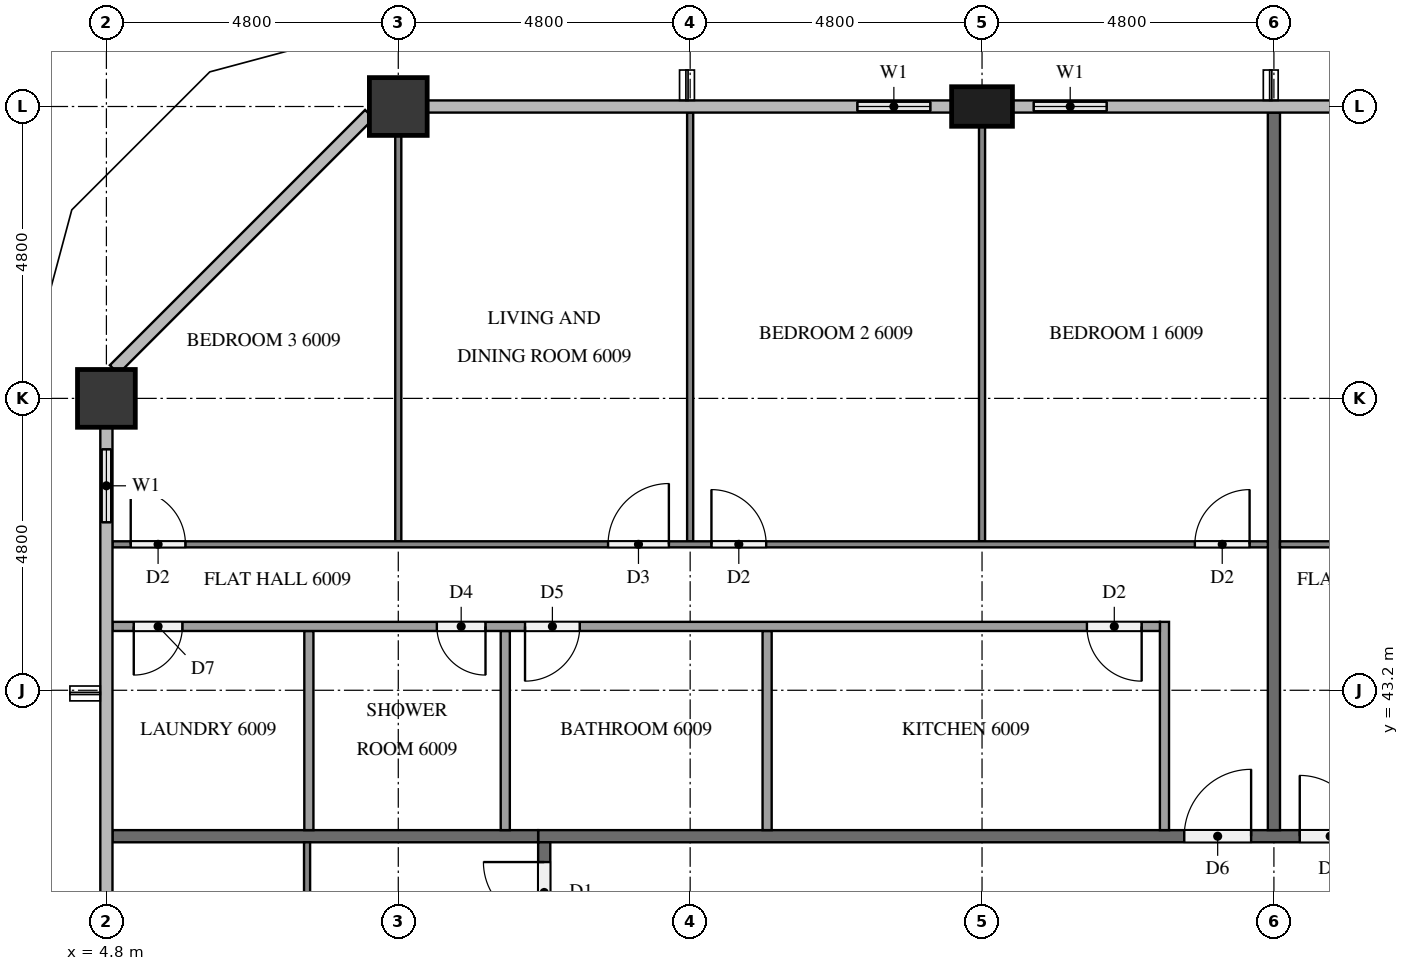
"""IFC4 building model, lengths in metres.
Left out: names, types, materials, properties, quantities, classifications, styles, units other than length and angle.
Written with IfcOpenShell. Run it as: python <this file> out.ifc"""

import sys

from ifc_helpers import new_model, si_unit, direction, frame, frame_2d, origin, origin_2d, place, context, subcontext, project, spatial, rectangle, extrude, element, fill, save


model = new_model("IFC4")
c1 = context("Model", 3, precision=1e-05, world=origin(), true_north=direction((0.0, 1.0)))
c2 = subcontext(c1, "Body", "Model", "MODEL_VIEW")
j1 = project(units=[si_unit("LENGTHUNIT", "METRE"), si_unit("PLANEANGLEUNIT", "RADIAN")], contexts=[c1])
p1 = place(None, origin())
s1 = spatial("IfcSite", under=j1, at=p1, CompositionType="ELEMENT")
p2 = place(p1, origin())
s2 = spatial("IfcBuilding", under=s1, at=p2, CompositionType="ELEMENT")
p3 = place(p2, frame((0.0, 0.0, 229.8)))
s3 = spatial("IfcBuildingStorey", under=s2, at=p3, CompositionType="ELEMENT", Elevation=229.8)
p4 = place(p3, frame((19.2, 52.8, 0.0), z_axis=(0.0, 0.0, 1.0), x_axis=(1.0, 0.0, 0.0)))
e1 = element("IfcColumn", 1, at=p4, inside=s3, PredefinedType="COLUMN", context=c2, shape_type="SweptSolid", body=[
    extrude(rectangle(XDim=1.0, YDim=0.65, at=origin_2d()), origin(), (0.0, 0.0, 1.0), 3.1),
])
for number, where, z_axis, x_axis in (
    (2, (9.6, 52.8, 0.0), (0.0, 0.0, 1.0), (1.0, 0.0, 0.0)),
    (3, (4.8, 48.0, 0.0), (0.0, 0.0, 1.0), (1.0, 0.0, 0.0)),
):
    element("IfcColumn", number, at=place(p3, frame(where, z_axis=z_axis, x_axis=x_axis)), inside=s3, PredefinedType="COLUMN", context=c2, shape_type="SweptSolid", body=[
        extrude(rectangle(XDim=0.95, YDim=0.95, at=origin_2d()), origin(), (0.0, 0.0, 1.0), 3.1),
    ])
p5 = place(p3, frame((21.6, 52.8, 0.0), z_axis=(0.0, 0.0, 1.0), x_axis=(-1.0, 0.0, 0.0)))
e4 = element("IfcWall", 4, at=p5, inside=s3, PredefinedType="SOLIDWALL", context=c2, shape_type="SweptSolid", body=[
    extrude(rectangle(XDim=1.9, YDim=0.15, at=frame_2d((0.95, 0.0))), origin(), (0.0, 0.0, 1.0), 3.1),
])
p6 = place(p5, frame((0.35, 0.0, 0.9)))
e5 = element("IfcOpeningElement", 5, at=p6, cuts=e4, PredefinedType="OPENING", context=c2, shape_type="SweptSolid", body=[
    extrude(rectangle(XDim=1.2, YDim=1.4, at=frame_2d((0.6, 0.7))), frame((0.0, 0.085, 0.0), z_axis=(0.0, -1.0, 0.0), x_axis=(1.0, 0.0, 0.0)), (0.0, 0.0, 1.0), 0.17),
])
p7 = place(p3, frame((18.7, 52.8, 0.0), z_axis=(0.0, 0.0, 1.0), x_axis=(-1.0, 0.0, 0.0)))
e6 = element("IfcWall", 6, at=p7, inside=s3, PredefinedType="SOLIDWALL", context=c2, shape_type="SweptSolid", body=[
    extrude(rectangle(XDim=1.9, YDim=0.15, at=frame_2d((0.95, 0.0))), origin(), (0.0, 0.0, 1.0), 3.1),
])
p8 = place(p7, frame((0.35, 0.0, 0.9)))
e7 = element("IfcOpeningElement", 7, at=p8, cuts=e6, PredefinedType="OPENING", context=c2, shape_type="SweptSolid", body=[
    extrude(rectangle(XDim=1.2, YDim=1.4, at=frame_2d((0.6, 0.7))), frame((0.0, 0.085, 0.0), z_axis=(0.0, -1.0, 0.0), x_axis=(1.0, 0.0, 0.0)), (0.0, 0.0, 1.0), 0.17),
])
p9 = place(p3, frame((4.8, 47.525, 0.0), z_axis=(0.0, 0.0, 1.0), x_axis=(0.0, -1.0, 0.0)))
e8 = element("IfcWall", 8, at=p9, inside=s3, PredefinedType="SOLIDWALL", context=c2, shape_type="SweptSolid", body=[
    extrude(rectangle(XDim=1.925, YDim=0.15, at=frame_2d((0.962, 0.0))), origin(), (0.0, 0.0, 1.0), 3.1),
])
p10 = place(p9, frame((0.363, 0.0, 0.9)))
e9 = element("IfcOpeningElement", 9, at=p10, cuts=e8, PredefinedType="OPENING", context=c2, shape_type="SweptSolid", body=[
    extrude(rectangle(XDim=1.2, YDim=1.4, at=frame_2d((0.6, 0.7))), frame((0.0, 0.085, 0.0), z_axis=(0.0, -1.0, 0.0), x_axis=(1.0, 0.0, 0.0)), (0.0, 0.0, 1.0), 0.17),
])
p11 = place(p3, frame((11.9, 40.8, 0.0), z_axis=(0.0, 0.0, 1.0), x_axis=(1.0, 0.0, 0.0)))
e10 = element("IfcWall", 10, at=p11, inside=s3, PredefinedType="PARTITIONING", context=c2, shape_type="SweptSolid", body=[
    extrude(rectangle(XDim=38.6, YDim=0.2, at=frame_2d((19.3, 0.0))), origin(), (0.0, 0.0, 1.0), 3.1),
])
p12 = place(p11, frame((37.075, 0.0, 0.0)))
e11 = element("IfcOpeningElement", 11, at=p12, cuts=e10, PredefinedType="OPENING", context=c2, shape_type="SweptSolid", body=[
    extrude(rectangle(XDim=1.0, YDim=2.1, at=frame_2d((0.5, 1.05))), frame((0.0, 0.11, 0.0), z_axis=(0.0, -1.0, 0.0), x_axis=(1.0, 0.0, 0.0)), (0.0, 0.0, 1.0), 0.22),
])
p13 = place(p11, frame((12.525, 0.0, 0.0)))
e12 = element("IfcOpeningElement", 12, at=p13, cuts=e10, PredefinedType="OPENING", context=c2, shape_type="SweptSolid", body=[
    extrude(rectangle(XDim=1.0, YDim=2.1, at=frame_2d((0.5, 1.05))), frame((0.0, 0.11, 0.0), z_axis=(0.0, -1.0, 0.0), x_axis=(1.0, 0.0, 0.0)), (0.0, 0.0, 1.0), 0.22),
])
p14 = place(p11, frame((10.625, 0.0, 0.0)))
e13 = element("IfcOpeningElement", 13, at=p14, cuts=e10, PredefinedType="OPENING", context=c2, shape_type="SweptSolid", body=[
    extrude(rectangle(XDim=1.1, YDim=2.1, at=frame_2d((0.55, 1.05))), frame((0.0, 0.11, 0.0), z_axis=(0.0, -1.0, 0.0), x_axis=(1.0, 0.0, 0.0)), (0.0, 0.0, 1.0), 0.22),
])
p15 = place(p3, frame((12.0, 12.1, 0.0), z_axis=(0.0, 0.0, 1.0), x_axis=(0.0, 1.0, 0.0)))
e14 = element("IfcWall", 14, at=p15, inside=s3, PredefinedType="PARTITIONING", context=c2, shape_type="SweptSolid", body=[
    extrude(rectangle(XDim=28.6, YDim=0.2, at=frame_2d((14.3, 0.0))), origin(), (0.0, 0.0, 1.0), 3.1),
])
p16 = place(p15, frame((27.275, 0.0, 0.0)))
e15 = element("IfcOpeningElement", 15, at=p16, cuts=e14, PredefinedType="OPENING", context=c2, shape_type="SweptSolid", body=[
    extrude(rectangle(XDim=1.0, YDim=2.1, at=frame_2d((0.5, 1.05))), frame((0.0, 0.11, 0.0), z_axis=(0.0, -1.0, 0.0), x_axis=(1.0, 0.0, 0.0)), (0.0, 0.0, 1.0), 0.22),
])
p17 = place(p15, frame((20.075, 0.0, 0.0)))
e16 = element("IfcOpeningElement", 16, at=p17, cuts=e14, PredefinedType="OPENING", context=c2, shape_type="SweptSolid", body=[
    extrude(rectangle(XDim=1.0, YDim=2.1, at=frame_2d((0.5, 1.05))), frame((0.0, 0.11, 0.0), z_axis=(0.0, -1.0, 0.0), x_axis=(1.0, 0.0, 0.0)), (0.0, 0.0, 1.0), 0.22),
])
p18 = place(p15, frame((10.425, 0.0, 0.0)))
e17 = element("IfcOpeningElement", 17, at=p18, cuts=e14, PredefinedType="OPENING", context=c2, shape_type="SweptSolid", body=[
    extrude(rectangle(XDim=1.1, YDim=2.1, at=frame_2d((0.55, 1.05))), frame((0.0, 0.11, 0.0), z_axis=(0.0, -1.0, 0.0), x_axis=(1.0, 0.0, 0.0)), (0.0, 0.0, 1.0), 0.22),
])
p19 = place(p3, frame((24.0, 52.7, 0.0), z_axis=(0.0, 0.0, 1.0), x_axis=(0.0, -1.0, 0.0)))
e18 = element("IfcWall", 18, at=p19, inside=s3, PredefinedType="PARTITIONING", context=c2, shape_type="SweptSolid", body=[
    extrude(rectangle(XDim=11.8, YDim=0.2, at=frame_2d((5.9, 0.0))), origin(), (0.0, 0.0, 1.0), 3.1),
])
p20 = place(p3, frame((4.9, 40.8, 0.0), z_axis=(0.0, 0.0, 1.0), x_axis=(1.0, 0.0, 0.0)))
e19 = element("IfcWall", 19, at=p20, inside=s3, PredefinedType="PARTITIONING", context=c2, shape_type="SweptSolid", body=[
    extrude(rectangle(XDim=7.0, YDim=0.2, at=frame_2d((3.5, 0.0))), origin(), (0.0, 0.0, 1.0), 3.1),
])
p21 = place(p3, frame((24.1, 45.6, 0.0), z_axis=(0.0, 0.0, 1.0), x_axis=(1.0, 0.0, 0.0)))
e20 = element("IfcWall", 20, at=p21, inside=s3, PredefinedType="PARTITIONING", context=c2, shape_type="SweptSolid", body=[
    extrude(rectangle(XDim=14.2, YDim=0.1, at=frame_2d((7.1, 0.0))), origin(), (0.0, 0.0, 1.0), 3.1),
])
p22 = place(p21, frame((3.45, 0.0, 0.0)))
e21 = element("IfcOpeningElement", 21, at=p22, cuts=e20, PredefinedType="OPENING", context=c2, shape_type="SweptSolid", body=[
    extrude(rectangle(XDim=0.9, YDim=2.1, at=frame_2d((0.45, 1.05))), frame((0.0, 0.06, 0.0), z_axis=(0.0, -1.0, 0.0), x_axis=(1.0, 0.0, 0.0)), (0.0, 0.0, 1.0), 0.12),
])
p23 = place(p21, frame((5.05, 0.0, 0.0)))
e22 = element("IfcOpeningElement", 22, at=p23, cuts=e20, PredefinedType="OPENING", context=c2, shape_type="SweptSolid", body=[
    extrude(rectangle(XDim=1.0, YDim=2.1, at=frame_2d((0.5, 1.05))), frame((0.0, 0.06, 0.0), z_axis=(0.0, -1.0, 0.0), x_axis=(1.0, 0.0, 0.0)), (0.0, 0.0, 1.0), 0.12),
])
p24 = place(p21, frame((13.0, 0.0, 0.0)))
e23 = element("IfcOpeningElement", 23, at=p24, cuts=e20, PredefinedType="OPENING", context=c2, shape_type="SweptSolid", body=[
    extrude(rectangle(XDim=0.9, YDim=2.1, at=frame_2d((0.45, 1.05))), frame((0.0, 0.06, 0.0), z_axis=(0.0, -1.0, 0.0), x_axis=(1.0, 0.0, 0.0)), (0.0, 0.0, 1.0), 0.12),
])
p25 = place(p3, frame((19.2, 45.65, 0.0), z_axis=(0.0, 0.0, 1.0), x_axis=(0.0, 1.0, 0.0)))
e24 = element("IfcWall", 24, at=p25, inside=s3, PredefinedType="PARTITIONING", context=c2, shape_type="SweptSolid", body=[
    extrude(rectangle(XDim=6.825, YDim=0.1, at=frame_2d((3.413, 0.0))), origin(), (0.0, 0.0, 1.0), 3.1),
])
p26 = place(p3, frame((14.4, 45.65, 0.0), z_axis=(0.0, 0.0, 1.0), x_axis=(0.0, 1.0, 0.0)))
e25 = element("IfcWall", 25, at=p26, inside=s3, PredefinedType="PARTITIONING", context=c2, shape_type="SweptSolid", body=[
    extrude(rectangle(XDim=7.05, YDim=0.1, at=frame_2d((3.525, 0.0))), origin(), (0.0, 0.0, 1.0), 3.1),
])
p27 = place(p3, frame((9.6, 45.65, 0.0), z_axis=(0.0, 0.0, 1.0), x_axis=(0.0, 1.0, 0.0)))
e26 = element("IfcWall", 26, at=p27, inside=s3, PredefinedType="PARTITIONING", context=c2, shape_type="SweptSolid", body=[
    extrude(rectangle(XDim=6.675, YDim=0.1, at=frame_2d((3.337, 0.0))), origin(), (0.0, 0.0, 1.0), 3.1),
])
p28 = place(p3, frame((4.9, 45.6, 0.0), z_axis=(0.0, 0.0, 1.0), x_axis=(1.0, 0.0, 0.0)))
e27 = element("IfcWall", 27, at=p28, inside=s3, PredefinedType="PARTITIONING", context=c2, shape_type="SweptSolid", body=[
    extrude(rectangle(XDim=19.0, YDim=0.1, at=frame_2d((9.5, 0.0))), origin(), (0.0, 0.0, 1.0), 3.1),
])
p29 = place(p28, frame((17.8, 0.0, 0.0)))
e28 = element("IfcOpeningElement", 28, at=p29, cuts=e27, PredefinedType="OPENING", context=c2, shape_type="SweptSolid", body=[
    extrude(rectangle(XDim=0.9, YDim=2.1, at=frame_2d((0.45, 1.05))), frame((0.0, 0.06, 0.0), z_axis=(0.0, -1.0, 0.0), x_axis=(1.0, 0.0, 0.0)), (0.0, 0.0, 1.0), 0.12),
])
p30 = place(p28, frame((9.85, 0.0, 0.0)))
e29 = element("IfcOpeningElement", 29, at=p30, cuts=e27, PredefinedType="OPENING", context=c2, shape_type="SweptSolid", body=[
    extrude(rectangle(XDim=0.9, YDim=2.1, at=frame_2d((0.45, 1.05))), frame((0.0, 0.06, 0.0), z_axis=(0.0, -1.0, 0.0), x_axis=(1.0, 0.0, 0.0)), (0.0, 0.0, 1.0), 0.12),
])
p31 = place(p28, frame((8.15, 0.0, 0.0)))
e30 = element("IfcOpeningElement", 30, at=p31, cuts=e27, PredefinedType="OPENING", context=c2, shape_type="SweptSolid", body=[
    extrude(rectangle(XDim=1.0, YDim=2.1, at=frame_2d((0.5, 1.05))), frame((0.0, 0.06, 0.0), z_axis=(0.0, -1.0, 0.0), x_axis=(1.0, 0.0, 0.0)), (0.0, 0.0, 1.0), 0.12),
])
p32 = place(p28, frame((0.3, 0.0, 0.0)))
e31 = element("IfcOpeningElement", 31, at=p32, cuts=e27, PredefinedType="OPENING", context=c2, shape_type="SweptSolid", body=[
    extrude(rectangle(XDim=0.9, YDim=2.1, at=frame_2d((0.45, 1.05))), frame((0.0, 0.06, 0.0), z_axis=(0.0, -1.0, 0.0), x_axis=(1.0, 0.0, 0.0)), (0.0, 0.0, 1.0), 0.12),
])
for number, where, z_axis, x_axis in (
    (32, (15.666, 40.9, 0.0), (0.0, 0.0, 1.0), (0.0, 1.0, 0.0)),
    (33, (11.359, 40.9, 0.0), (0.0, 0.0, 1.0), (0.0, 1.0, 0.0)),
    (34, (8.13, 40.9, 0.0), (0.0, 0.0, 1.0), (0.0, 1.0, 0.0)),
):
    element("IfcWall", number, at=place(p3, frame(where, z_axis=z_axis, x_axis=x_axis)), inside=s3, PredefinedType="PARTITIONING", context=c2, shape_type="SweptSolid", body=[
        extrude(rectangle(XDim=3.275, YDim=0.15, at=frame_2d((1.638, 0.0))), origin(), (0.0, 0.0, 1.0), 3.1),
    ])
p33 = place(p3, frame((22.2, 40.9, 0.0), z_axis=(0.0, 0.0, 1.0), x_axis=(0.0, 1.0, 0.0)))
e35 = element("IfcWall", 35, at=p33, inside=s3, PredefinedType="PARTITIONING", context=c2, shape_type="SweptSolid", body=[
    extrude(rectangle(XDim=3.425, YDim=0.15, at=frame_2d((1.712, 0.0))), origin(), (0.0, 0.0, 1.0), 3.1),
])
p34 = place(p3, frame((22.125, 44.25, 0.0), z_axis=(0.0, 0.0, 1.0), x_axis=(-1.0, 0.0, 0.0)))
e36 = element("IfcWall", 36, at=p34, inside=s3, PredefinedType="PARTITIONING", context=c2, shape_type="SweptSolid", body=[
    extrude(rectangle(XDim=17.225, YDim=0.15, at=frame_2d((8.613, 0.0))), origin(), (0.0, 0.0, 1.0), 3.1),
])
p35 = place(p34, frame((0.3, 0.0, 0.0)))
e37 = element("IfcOpeningElement", 37, at=p35, cuts=e36, PredefinedType="OPENING", context=c2, shape_type="SweptSolid", body=[
    extrude(rectangle(XDim=0.9, YDim=2.1, at=frame_2d((0.45, 1.05))), frame((0.0, 0.085, 0.0), z_axis=(0.0, -1.0, 0.0), x_axis=(1.0, 0.0, 0.0)), (0.0, 0.0, 1.0), 0.17),
])
p36 = place(p34, frame((9.541, 0.0, 0.0)))
e38 = element("IfcOpeningElement", 38, at=p36, cuts=e36, PredefinedType="OPENING", context=c2, shape_type="SweptSolid", body=[
    extrude(rectangle(XDim=0.9, YDim=2.1, at=frame_2d((0.45, 1.05))), frame((0.0, 0.085, 0.0), z_axis=(0.0, -1.0, 0.0), x_axis=(1.0, 0.0, 0.0)), (0.0, 0.0, 1.0), 0.17),
])
p37 = place(p34, frame((11.091, 0.0, 0.0)))
e39 = element("IfcOpeningElement", 39, at=p37, cuts=e36, PredefinedType="OPENING", context=c2, shape_type="SweptSolid", body=[
    extrude(rectangle(XDim=0.8, YDim=2.1, at=frame_2d((0.4, 1.05))), frame((0.0, 0.085, 0.0), z_axis=(0.0, -1.0, 0.0), x_axis=(1.0, 0.0, 0.0)), (0.0, 0.0, 1.0), 0.17),
])
p38 = place(p34, frame((16.075, 0.0, 0.0)))
e40 = element("IfcOpeningElement", 40, at=p38, cuts=e36, PredefinedType="OPENING", context=c2, shape_type="SweptSolid", body=[
    extrude(rectangle(XDim=0.8, YDim=2.1, at=frame_2d((0.4, 1.05))), frame((0.0, 0.085, 0.0), z_axis=(0.0, -1.0, 0.0), x_axis=(1.0, 0.0, 0.0)), (0.0, 0.0, 1.0), 0.17),
])
p39 = place(p3, frame((8.1, 33.7, 0.0), z_axis=(0.0, 0.0, 1.0), x_axis=(0.0, 1.0, 0.0)))
e41 = element("IfcWall", 41, at=p39, inside=s3, PredefinedType="PARTITIONING", context=c2, shape_type="SweptSolid", body=[
    extrude(rectangle(XDim=7.0, YDim=0.1, at=frame_2d((3.5, 0.0))), origin(), (0.0, 0.0, 1.0), 3.1),
])
p40 = place(p39, frame((0.3, 0.0, 0.0)))
e42 = element("IfcOpeningElement", 42, at=p40, cuts=e41, PredefinedType="OPENING", context=c2, shape_type="SweptSolid", body=[
    extrude(rectangle(XDim=1.0, YDim=2.1, at=frame_2d((0.5, 1.05))), frame((0.0, 0.06, 0.0), z_axis=(0.0, -1.0, 0.0), x_axis=(1.0, 0.0, 0.0)), (0.0, 0.0, 1.0), 0.12),
])
p41 = place(p6, origin())
e43 = element("IfcWindow", 43, at=p41, inside=s3, PartitioningType="SINGLE_PANEL", PredefinedType="WINDOW", context=c2, shape_type="SweptSolid", body=[
    extrude(rectangle(XDim=1.2, YDim=1.4, at=frame_2d((0.6, 0.7))), frame((0.0, 0.03, 0.0), z_axis=(0.0, -1.0, 0.0), x_axis=(1.0, 0.0, 0.0)), (0.0, 0.0, 1.0), 0.06),
])
fill(e5, e43)
p42 = place(p8, origin())
e44 = element("IfcWindow", 44, at=p42, inside=s3, PartitioningType="SINGLE_PANEL", PredefinedType="WINDOW", context=c2, shape_type="SweptSolid", body=[
    extrude(rectangle(XDim=1.2, YDim=1.4, at=frame_2d((0.6, 0.7))), frame((0.0, 0.03, 0.0), z_axis=(0.0, -1.0, 0.0), x_axis=(1.0, 0.0, 0.0)), (0.0, 0.0, 1.0), 0.06),
])
fill(e7, e44)
p43 = place(p10, origin())
e45 = element("IfcWindow", 45, at=p43, inside=s3, PartitioningType="SINGLE_PANEL", PredefinedType="WINDOW", context=c2, shape_type="SweptSolid", body=[
    extrude(rectangle(XDim=1.2, YDim=1.4, at=frame_2d((0.6, 0.7))), frame((0.0, 0.03, 0.0), z_axis=(0.0, -1.0, 0.0), x_axis=(1.0, 0.0, 0.0)), (0.0, 0.0, 1.0), 0.06),
])
fill(e9, e45)
p44 = place(p13, origin())
e46 = element("IfcDoor", 46, at=p44, inside=s3, OperationType="SINGLE_SWING_LEFT", PredefinedType="DOOR", context=c2, shape_type="SweptSolid", body=[
    extrude(rectangle(XDim=1.0, YDim=2.1, at=frame_2d((0.5, 1.05))), frame((0.0, 0.025, 0.0), z_axis=(0.0, -1.0, 0.0), x_axis=(1.0, 0.0, 0.0)), (0.0, 0.0, 1.0), 0.05),
])
fill(e12, e46)
p45 = place(p14, origin())
e47 = element("IfcDoor", 47, at=p45, inside=s3, OperationType="SINGLE_SWING_RIGHT", PredefinedType="DOOR", context=c2, shape_type="SweptSolid", body=[
    extrude(rectangle(XDim=1.1, YDim=2.1, at=frame_2d((0.55, 1.05))), frame((0.0, 0.025, 0.0), z_axis=(0.0, -1.0, 0.0), x_axis=(1.0, 0.0, 0.0)), (0.0, 0.0, 1.0), 0.05),
])
fill(e13, e47)
p46 = place(p16, origin())
e48 = element("IfcDoor", 48, at=p46, inside=s3, OperationType="SINGLE_SWING_RIGHT", PredefinedType="DOOR", context=c2, shape_type="SweptSolid", body=[
    extrude(rectangle(XDim=1.0, YDim=2.1, at=frame_2d((0.5, 1.05))), frame((0.0, 0.025, 0.0), z_axis=(0.0, -1.0, 0.0), x_axis=(1.0, 0.0, 0.0)), (0.0, 0.0, 1.0), 0.05),
])
fill(e15, e48)
p47 = place(p29, origin())
e49 = element("IfcDoor", 49, at=p47, inside=s3, OperationType="SINGLE_SWING_RIGHT", PredefinedType="DOOR", context=c2, shape_type="SweptSolid", body=[
    extrude(rectangle(XDim=0.9, YDim=2.1, at=frame_2d((0.45, 1.05))), frame((0.0, 0.025, 0.0), z_axis=(0.0, -1.0, 0.0), x_axis=(1.0, 0.0, 0.0)), (0.0, 0.0, 1.0), 0.05),
])
fill(e28, e49)
p48 = place(p30, origin())
e50 = element("IfcDoor", 50, at=p48, inside=s3, OperationType="SINGLE_SWING_LEFT", PredefinedType="DOOR", context=c2, shape_type="SweptSolid", body=[
    extrude(rectangle(XDim=0.9, YDim=2.1, at=frame_2d((0.45, 1.05))), frame((0.0, 0.025, 0.0), z_axis=(0.0, -1.0, 0.0), x_axis=(1.0, 0.0, 0.0)), (0.0, 0.0, 1.0), 0.05),
])
fill(e29, e50)
p49 = place(p31, origin())
e51 = element("IfcDoor", 51, at=p49, inside=s3, OperationType="SINGLE_SWING_RIGHT", PredefinedType="DOOR", context=c2, shape_type="SweptSolid", body=[
    extrude(rectangle(XDim=1.0, YDim=2.1, at=frame_2d((0.5, 1.05))), frame((0.0, 0.025, 0.0), z_axis=(0.0, -1.0, 0.0), x_axis=(1.0, 0.0, 0.0)), (0.0, 0.0, 1.0), 0.05),
])
fill(e30, e51)
p50 = place(p32, origin())
e52 = element("IfcDoor", 52, at=p50, inside=s3, OperationType="SINGLE_SWING_LEFT", PredefinedType="DOOR", context=c2, shape_type="SweptSolid", body=[
    extrude(rectangle(XDim=0.9, YDim=2.1, at=frame_2d((0.45, 1.05))), frame((0.0, 0.025, 0.0), z_axis=(0.0, -1.0, 0.0), x_axis=(1.0, 0.0, 0.0)), (0.0, 0.0, 1.0), 0.05),
])
fill(e31, e52)
p51 = place(p35, origin())
e53 = element("IfcDoor", 53, at=p51, inside=s3, OperationType="SINGLE_SWING_LEFT", PredefinedType="DOOR", context=c2, shape_type="SweptSolid", body=[
    extrude(rectangle(XDim=0.9, YDim=2.1, at=frame_2d((0.45, 1.05))), frame((0.0, 0.025, 0.0), z_axis=(0.0, -1.0, 0.0), x_axis=(1.0, 0.0, 0.0)), (0.0, 0.0, 1.0), 0.05),
])
fill(e37, e53)
p52 = place(p36, origin())
e54 = element("IfcDoor", 54, at=p52, inside=s3, OperationType="SINGLE_SWING_RIGHT", PredefinedType="DOOR", context=c2, shape_type="SweptSolid", body=[
    extrude(rectangle(XDim=0.9, YDim=2.1, at=frame_2d((0.45, 1.05))), frame((0.0, 0.025, 0.0), z_axis=(0.0, -1.0, 0.0), x_axis=(1.0, 0.0, 0.0)), (0.0, 0.0, 1.0), 0.05),
])
fill(e38, e54)
p53 = place(p37, origin())
e55 = element("IfcDoor", 55, at=p53, inside=s3, OperationType="SINGLE_SWING_LEFT", PredefinedType="DOOR", context=c2, shape_type="SweptSolid", body=[
    extrude(rectangle(XDim=0.8, YDim=2.1, at=frame_2d((0.4, 1.05))), frame((0.0, 0.025, 0.0), z_axis=(0.0, -1.0, 0.0), x_axis=(1.0, 0.0, 0.0)), (0.0, 0.0, 1.0), 0.05),
])
fill(e39, e55)
p54 = place(p38, origin())
e56 = element("IfcDoor", 56, at=p54, inside=s3, OperationType="SINGLE_SWING_RIGHT", PredefinedType="DOOR", context=c2, shape_type="SweptSolid", body=[
    extrude(rectangle(XDim=0.8, YDim=2.1, at=frame_2d((0.4, 1.05))), frame((0.0, 0.025, 0.0), z_axis=(0.0, -1.0, 0.0), x_axis=(1.0, 0.0, 0.0)), (0.0, 0.0, 1.0), 0.05),
])
fill(e40, e56)
save(model, sys.argv[1])
